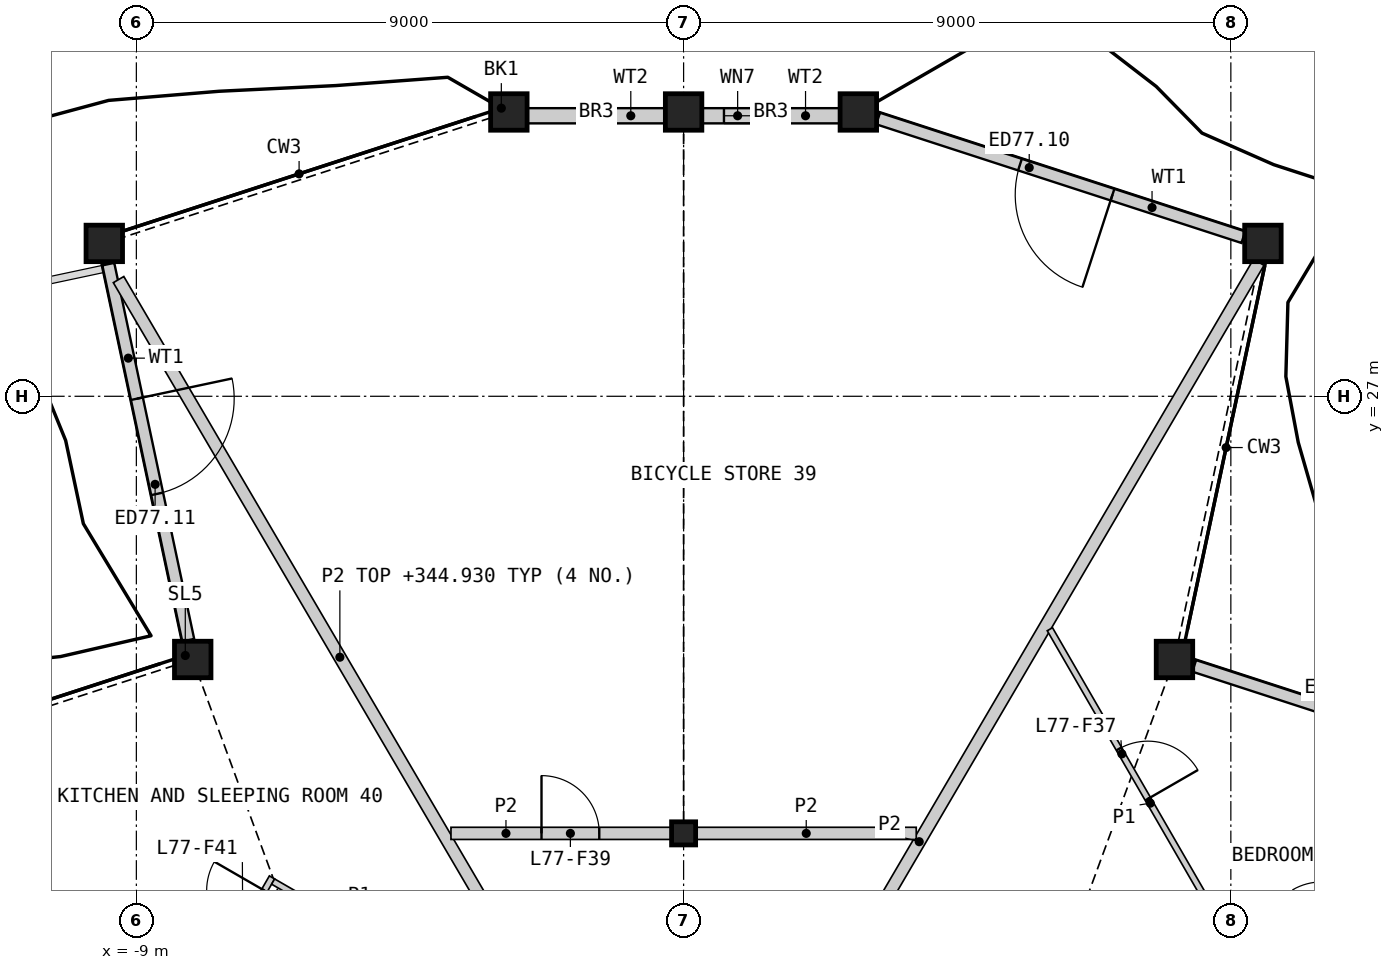
"""IFC4 building model, lengths in metres.
Left out: names, types, materials, properties, quantities, classifications, styles, units other than length and angle.
Written with IfcOpenShell. Run it as: python <this file> out.ifc"""

import sys

from ifc_helpers import new_model, si_unit, direction, frame, frame_2d, origin, origin_2d, place, context, subcontext, project, spatial, rectangle, hollow_rectangle, i_section, extrude, element, fill, save


model = new_model("IFC4")
c1 = context("Model", 3, precision=1e-05, world=origin(), true_north=direction((0.0, 1.0)))
c2 = subcontext(c1, "Body", "Model", "MODEL_VIEW")
j1 = project(units=[si_unit("LENGTHUNIT", "METRE"), si_unit("PLANEANGLEUNIT", "RADIAN")], contexts=[c1])
p1 = place(None, origin())
s1 = spatial("IfcSite", under=j1, at=p1, CompositionType="ELEMENT")
p2 = place(p1, origin())
s2 = spatial("IfcBuilding", under=s1, at=p2, CompositionType="ELEMENT")
p3 = place(p2, frame((0.0, 0.0, 342.6)))
s3 = spatial("IfcBuildingStorey", under=s2, at=p3, CompositionType="ELEMENT", Elevation=342.6)
for number, where, z_axis, x_axis in (
    (1, (8.073, 22.671, 0.0), (0.0, 0.0, 1.0), (1.0, 0.0, 0.0)),
    (2, (9.527, 29.514, 0.0), (0.0, 0.0, 1.0), (1.0, 0.0, 0.0)),
    (3, (2.874, 31.676, 0.0), (0.0, 0.0, 1.0), (1.0, 0.0, 0.0)),
    (4, (0.0, 31.676, 0.0), (0.0, 0.0, 1.0), (1.0, 0.0, 0.0)),
    (5, (-2.874, 31.676, 0.0), (0.0, 0.0, 1.0), (1.0, 0.0, 0.0)),
    (6, (-9.527, 29.514, 0.0), (0.0, 0.0, 1.0), (1.0, 0.0, 0.0)),
    (7, (-8.073, 22.671, 0.0), (0.0, 0.0, 1.0), (1.0, 0.0, 0.0)),
):
    element("IfcColumn", number, at=place(p3, frame(where, z_axis=z_axis, x_axis=x_axis)), inside=s3, PredefinedType="COLUMN", context=c2, shape_type="SweptSolid", body=[
        extrude(hollow_rectangle(XDim=0.6, YDim=0.6, WallThickness=0.04, at=origin_2d()), origin(), (0.0, 0.0, 1.0), 3.4),
    ])
p4 = place(p3, frame((0.0, 19.811, 0.0), z_axis=(0.0, 0.0, 1.0), x_axis=(1.0, 0.0, 0.0)))
e8 = element("IfcColumn", 8, at=p4, inside=s3, PredefinedType="COLUMN", context=c2, shape_type="SweptSolid", body=[
    extrude(i_section(OverallWidth=0.396, OverallDepth=0.381, WebThickness=0.019, FlangeThickness=0.03, at=origin_2d()), origin(), (0.0, 0.0, 1.0), 3.4),
])
p5 = place(p3, frame((14.403, 20.614, 0.0), z_axis=(0.0, 0.0, 1.0), x_axis=(-0.951053103012, 0.309027499182, 0.0)))
e9 = element("IfcWall", 9, at=p5, inside=s3, PredefinedType="SOLIDWALL", context=c2, shape_type="SweptSolid", body=[
    extrude(rectangle(XDim=6.315, YDim=0.2, at=frame_2d((3.157, 0.0))), origin(), (0.0, 0.0, 1.0), 2.488),
])
p6 = place(p5, frame((2.263, 0.0, 0.0)))
e10 = element("IfcOpeningElement", 10, at=p6, cuts=e9, PredefinedType="OPENING", context=c2, shape_type="SweptSolid", body=[
    extrude(rectangle(XDim=1.6, YDim=2.25, at=frame_2d((0.8, 1.125))), frame((0.0, 0.11, 0.0), z_axis=(0.0, -1.0, 0.0), x_axis=(1.0, 0.0, 0.0)), (0.0, 0.0, 1.0), 0.22),
])
p7 = place(p3, frame((9.206, 29.616, 0.0), z_axis=(0.0, 0.0, 1.0), x_axis=(-0.951056221468, 0.309017901757, 0.0)))
e11 = element("IfcWall", 11, at=p7, inside=s3, PredefinedType="SOLIDWALL", context=c2, shape_type="SweptSolid", body=[
    extrude(rectangle(XDim=6.316, YDim=0.2, at=frame_2d((3.158, 0.0))), origin(), (0.0, 0.0, 1.0), 2.488),
])
p8 = place(p7, frame((2.263, 0.0, 0.0)))
e12 = element("IfcOpeningElement", 12, at=p8, cuts=e11, PredefinedType="OPENING", context=c2, shape_type="SweptSolid", body=[
    extrude(rectangle(XDim=1.6, YDim=2.25, at=frame_2d((0.8, 1.125))), frame((0.0, 0.11, 0.0), z_axis=(0.0, -1.0, 0.0), x_axis=(1.0, 0.0, 0.0)), (0.0, 0.0, 1.0), 0.22),
])
p9 = place(p3, frame((2.574, 31.614, 0.0), z_axis=(0.0, 0.0, 1.0), x_axis=(-1.0, 0.0, 0.0)))
e13 = element("IfcWall", 13, at=p9, inside=s3, PredefinedType="SOLIDWALL", context=c2, shape_type="SweptSolid", body=[
    extrude(rectangle(XDim=2.274, YDim=0.25, at=frame_2d((1.137, 0.0))), origin(), (0.0, 0.0, 1.0), 2.488),
])
p10 = place(p9, frame((1.01, 0.0, 1.6)))
e14 = element("IfcOpeningElement", 14, at=p10, cuts=e13, PredefinedType="OPENING", context=c2, shape_type="SweptSolid", body=[
    extrude(rectangle(XDim=0.9, YDim=0.6, at=frame_2d((0.45, 0.3))), frame((0.0, 0.135, 0.0), z_axis=(0.0, -1.0, 0.0), x_axis=(1.0, 0.0, 0.0)), (0.0, 0.0, 1.0), 0.27),
])
p11 = place(p3, frame((-0.3, 31.614, 0.0), z_axis=(0.0, 0.0, 1.0), x_axis=(-1.0, 0.0, 0.0)))
e15 = element("IfcWall", 15, at=p11, inside=s3, PredefinedType="SOLIDWALL", context=c2, shape_type="SweptSolid", body=[
    extrude(rectangle(XDim=2.274, YDim=0.25, at=frame_2d((1.137, 0.0))), origin(), (0.0, 0.0, 1.0), 2.488),
])
p12 = place(p3, frame((-9.461, 29.174, 0.0), z_axis=(0.0, 0.0, 1.0), x_axis=(0.20791277238, -0.97814737084, 0.0)))
e16 = element("IfcWall", 16, at=p12, inside=s3, PredefinedType="SOLIDWALL", context=c2, shape_type="SweptSolid", body=[
    extrude(rectangle(XDim=6.324, YDim=0.2, at=frame_2d((3.162, 0.0))), origin(), (0.0, 0.0, 1.0), 2.488),
])
p13 = place(p12, frame((2.263, 0.0, 0.0)))
e17 = element("IfcOpeningElement", 17, at=p13, cuts=e16, PredefinedType="OPENING", context=c2, shape_type="SweptSolid", body=[
    extrude(rectangle(XDim=1.6, YDim=2.25, at=frame_2d((0.8, 1.125))), frame((0.0, 0.11, 0.0), z_axis=(0.0, -1.0, 0.0), x_axis=(1.0, 0.0, 0.0)), (0.0, 0.0, 1.0), 0.22),
])
p14 = place(p3, frame((-14.417, 20.327, 0.0), z_axis=(0.0, 0.0, 1.0), x_axis=(0.866018271907, -0.50001235257, 0.0)))
e18 = element("IfcWall", 18, at=p14, inside=s3, PredefinedType="PARTITIONING", context=c2, shape_type="SweptSolid", body=[
    extrude(rectangle(XDim=7.193, YDim=0.25, at=frame_2d((3.596, 0.0))), origin(), (0.0, 0.0, 1.0), 2.33),
])
p15 = place(p3, frame((-9.292, 28.919, 0.0), z_axis=(0.0, 0.0, 1.0), x_axis=(0.505558038556, -0.862792599442, 0.0)))
e19 = element("IfcWall", 19, at=p15, inside=s3, PredefinedType="PARTITIONING", context=c2, shape_type="SweptSolid", body=[
    extrude(rectangle(XDim=14.397, YDim=0.2, at=frame_2d((7.199, 0.0))), origin(), (0.0, 0.0, 1.0), 2.33),
])
p16 = place(p3, frame((2.014, 16.497, 0.0), z_axis=(0.0, 0.0, 1.0), x_axis=(0.5055676136, 0.862786988821, 0.0)))
e20 = element("IfcWall", 20, at=p16, inside=s3, PredefinedType="PARTITIONING", context=c2, shape_type="SweptSolid", body=[
    extrude(rectangle(XDim=14.728, YDim=0.2, at=frame_2d((7.364, 0.0))), origin(), (0.0, 0.0, 1.0), 2.33),
])
p17 = place(p3, frame((-3.826, 19.811, 0.0), z_axis=(0.0, 0.0, 1.0), x_axis=(1.0, 0.0, 0.0)))
e21 = element("IfcWall", 21, at=p17, inside=s3, PredefinedType="PARTITIONING", context=c2, shape_type="SweptSolid", body=[
    extrude(rectangle(XDim=3.618, YDim=0.2, at=frame_2d((1.809, 0.0))), origin(), (0.0, 0.0, 1.0), 2.33),
])
p18 = place(p17, frame((1.489, 0.0, 0.0)))
e22 = element("IfcOpeningElement", 22, at=p18, cuts=e21, PredefinedType="OPENING", context=c2, shape_type="SweptSolid", body=[
    extrude(rectangle(XDim=0.95, YDim=2.1, at=frame_2d((0.475, 1.05))), frame((0.0, 0.11, 0.0), z_axis=(0.0, -1.0, 0.0), x_axis=(1.0, 0.0, 0.0)), (0.0, 0.0, 1.0), 0.22),
])
p19 = place(p3, frame((0.208, 19.811, 0.0), z_axis=(0.0, 0.0, 1.0), x_axis=(1.0, 0.0, 0.0)))
e23 = element("IfcWall", 23, at=p19, inside=s3, PredefinedType="PARTITIONING", context=c2, shape_type="SweptSolid", body=[
    extrude(rectangle(XDim=3.618, YDim=0.2, at=frame_2d((1.809, 0.0))), origin(), (0.0, 0.0, 1.0), 2.33),
])
p20 = place(p3, frame((3.468, 14.005, 0.0), z_axis=(0.0, 0.0, 1.0), x_axis=(0.866020616849, 0.500008291124, 0.0)))
e24 = element("IfcWall", 24, at=p20, inside=s3, PredefinedType="PARTITIONING", context=c2, shape_type="SweptSolid", body=[
    extrude(rectangle(XDim=12.643, YDim=0.1, at=frame_2d((6.321, 0.0))), origin(), (0.0, 0.0, 1.0), 2.33),
])
p21 = place(p20, frame((8.115, 0.0, 0.0)))
e25 = element("IfcOpeningElement", 25, at=p21, cuts=e24, PredefinedType="OPENING", context=c2, shape_type="SweptSolid", body=[
    extrude(rectangle(XDim=0.95, YDim=2.1, at=frame_2d((0.475, 1.05))), frame((0.0, 0.06, 0.0), z_axis=(0.0, -1.0, 0.0), x_axis=(1.0, 0.0, 0.0)), (0.0, 0.0, 1.0), 0.12),
])
p22 = place(p3, frame((6.024, 23.169, 0.0), z_axis=(0.0, 0.0, 1.0), x_axis=(0.499997497522, -0.866026848586, 0.0)))
e26 = element("IfcWall", 26, at=p22, inside=s3, PredefinedType="PARTITIONING", context=c2, shape_type="SweptSolid", body=[
    extrude(rectangle(XDim=6.608, YDim=0.1, at=frame_2d((3.304, 0.0))), origin(), (0.0, 0.0, 1.0), 2.33),
])
p23 = place(p22, frame((2.273, 0.0, 0.0)))
e27 = element("IfcOpeningElement", 27, at=p23, cuts=e26, PredefinedType="OPENING", context=c2, shape_type="SweptSolid", body=[
    extrude(rectangle(XDim=0.95, YDim=2.1, at=frame_2d((0.475, 1.05))), frame((0.0, 0.06, 0.0), z_axis=(0.0, -1.0, 0.0), x_axis=(1.0, 0.0, 0.0)), (0.0, 0.0, 1.0), 0.12),
])
p24 = place(p3, frame((-9.519, 14.323, 0.0), z_axis=(0.0, 0.0, 1.0), x_axis=(0.499996545922, 0.866027397988, 0.0)))
e28 = element("IfcWall", 28, at=p24, inside=s3, PredefinedType="PARTITIONING", context=c2, shape_type="SweptSolid", body=[
    extrude(rectangle(XDim=5.5, YDim=0.1, at=frame_2d((2.75, 0.0))), origin(), (0.0, 0.0, 1.0), 2.33),
])
p25 = place(p24, frame((4.3, 0.0, 0.0)))
e29 = element("IfcOpeningElement", 29, at=p25, cuts=e28, PredefinedType="OPENING", context=c2, shape_type="SweptSolid", body=[
    extrude(rectangle(XDim=0.95, YDim=2.1, at=frame_2d((0.475, 1.05))), frame((0.0, 0.06, 0.0), z_axis=(0.0, -1.0, 0.0), x_axis=(1.0, 0.0, 0.0)), (0.0, 0.0, 1.0), 0.12),
])
p26 = place(p24, frame((0.25, 0.0, 0.0)))
e30 = element("IfcOpeningElement", 30, at=p26, cuts=e28, PredefinedType="OPENING", context=c2, shape_type="SweptSolid", body=[
    extrude(rectangle(XDim=0.95, YDim=2.1, at=frame_2d((0.475, 1.05))), frame((0.0, 0.06, 0.0), z_axis=(0.0, -1.0, 0.0), x_axis=(1.0, 0.0, 0.0)), (0.0, 0.0, 1.0), 0.12),
])
p27 = place(p3, frame((-6.751, 19.018, 0.0), z_axis=(0.0, 0.0, 1.0), x_axis=(0.866036505625, -0.499980770555, 0.0)))
e31 = element("IfcWall", 31, at=p27, inside=s3, PredefinedType="PARTITIONING", context=c2, shape_type="SweptSolid", body=[
    extrude(rectangle(XDim=2.7, YDim=0.1, at=frame_2d((1.35, 0.0))), origin(), (0.0, 0.0, 1.0), 2.33),
])
p28 = place(p8, origin())
e32 = element("IfcDoor", 32, at=p28, inside=s3, OperationType="DOUBLE_DOOR_SINGLE_SWING", PredefinedType="DOOR", context=c2, shape_type="SweptSolid", body=[
    extrude(rectangle(XDim=1.6, YDim=2.25, at=frame_2d((0.8, 1.125))), frame((0.0, 0.025, 0.0), z_axis=(0.0, -1.0, 0.0), x_axis=(1.0, 0.0, 0.0)), (0.0, 0.0, 1.0), 0.05),
])
fill(e12, e32)
p29 = place(p10, origin())
e33 = element("IfcWindow", 33, at=p29, inside=s3, PartitioningType="SINGLE_PANEL", PredefinedType="WINDOW", context=c2, shape_type="SweptSolid", body=[
    extrude(rectangle(XDim=0.9, YDim=0.6, at=frame_2d((0.45, 0.3))), frame((0.0, 0.03, 0.0), z_axis=(0.0, -1.0, 0.0), x_axis=(1.0, 0.0, 0.0)), (0.0, 0.0, 1.0), 0.06),
])
fill(e14, e33)
p30 = place(p13, origin())
e34 = element("IfcDoor", 34, at=p30, inside=s3, OperationType="DOUBLE_DOOR_SINGLE_SWING", PredefinedType="DOOR", context=c2, shape_type="SweptSolid", body=[
    extrude(rectangle(XDim=1.6, YDim=2.25, at=frame_2d((0.8, 1.125))), frame((0.0, 0.025, 0.0), z_axis=(0.0, -1.0, 0.0), x_axis=(1.0, 0.0, 0.0)), (0.0, 0.0, 1.0), 0.05),
])
fill(e17, e34)
p31 = place(p23, origin())
e35 = element("IfcDoor", 35, at=p31, inside=s3, OperationType="SINGLE_SWING_RIGHT", PredefinedType="DOOR", context=c2, shape_type="SweptSolid", body=[
    extrude(rectangle(XDim=0.95, YDim=2.1, at=frame_2d((0.475, 1.05))), frame((0.0, 0.025, 0.0), z_axis=(0.0, -1.0, 0.0), x_axis=(1.0, 0.0, 0.0)), (0.0, 0.0, 1.0), 0.05),
])
fill(e27, e35)
p32 = place(p18, origin())
e36 = element("IfcDoor", 36, at=p32, inside=s3, OperationType="SINGLE_SWING_LEFT", PredefinedType="DOOR", context=c2, shape_type="SweptSolid", body=[
    extrude(rectangle(XDim=0.95, YDim=2.1, at=frame_2d((0.475, 1.05))), frame((0.0, 0.025, 0.0), z_axis=(0.0, -1.0, 0.0), x_axis=(1.0, 0.0, 0.0)), (0.0, 0.0, 1.0), 0.05),
])
fill(e22, e36)
save(model, sys.argv[1])
